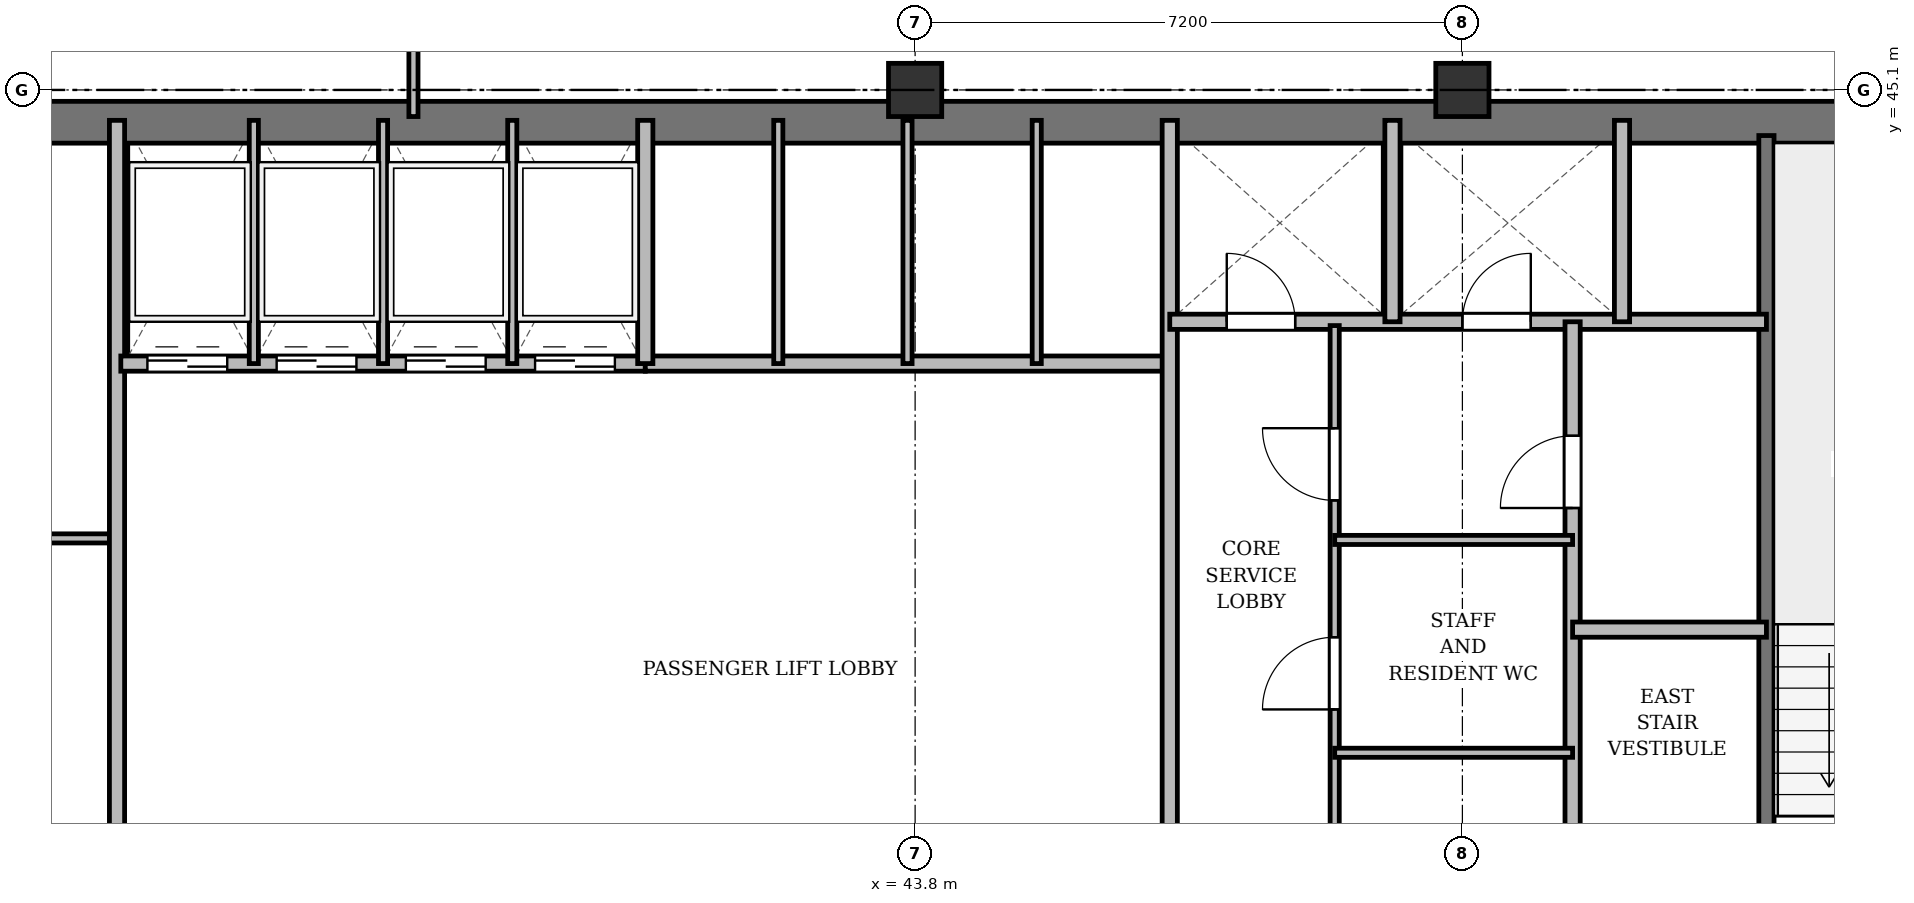
"""IFC4 building model, lengths in metres.
Left out: names, types, materials, properties, quantities, classifications, styles, units other than length and angle.
Written with IfcOpenShell. Run it as: python <this file> out.ifc"""

import sys

from ifc_helpers import new_model, si_unit, direction, frame, frame_2d, origin, origin_2d, place, context, subcontext, project, spatial, rectangle, extrude, source, transform, mapped, element, fill, save


model = new_model("IFC4")
c1 = context("Model", 3, precision=1e-05, world=origin(), true_north=direction((0.0, 1.0)))
c2 = subcontext(c1, "Body", "Model", "MODEL_VIEW")
j1 = project(units=[si_unit("LENGTHUNIT", "METRE"), si_unit("PLANEANGLEUNIT", "RADIAN")], contexts=[c1])
p1 = place(None, origin())
s1 = spatial("IfcSite", under=j1, at=p1, CompositionType="ELEMENT")
p2 = place(p1, origin())
s2 = spatial("IfcBuilding", under=s1, at=p2, CompositionType="ELEMENT")
p3 = place(p2, frame((0.0, 0.0, 157.3)))
s3 = spatial("IfcBuildingStorey", under=s2, at=p3, CompositionType="ELEMENT", Elevation=157.3)
m1 = source(origin(), c2, "Body", "SweptSolid", [
    extrude(rectangle(XDim=0.7, YDim=0.7, at=origin_2d()), origin(), (0.0, 0.0, 1.0), 3.6),
])
for number, where, z_axis, x_axis in (
    (1, (43.8, 45.1, 0.0), (0.0, 0.0, 1.0), (1.0, 0.0, 0.0)),
    (2, (51.0, 45.1, 0.0), (0.0, 0.0, 1.0), (1.0, 0.0, 0.0)),
):
    element("IfcColumn", number, at=place(p3, frame(where, z_axis=z_axis, x_axis=x_axis)), inside=s3, PredefinedType="COLUMN", context=c2, shape_type="MappedRepresentation", body=[
        mapped(m1, transform((0.0, 0.0, 0.0), x_axis=(1.0, 0.0, 0.0), y_axis=(0.0, 1.0, 0.0), z_axis=(0.0, 0.0, 1.0), scale=1.0)),
    ])
p4 = place(p3, frame((15.65, 44.675, 0.0), z_axis=(0.0, 0.0, 1.0), x_axis=(1.0, 0.0, 0.0)))
e3 = element("IfcWall", 3, at=p4, inside=s3, PredefinedType="SHEAR", context=c2, shape_type="SweptSolid", body=[
    extrude(rectangle(XDim=43.1, YDim=0.55, at=frame_2d((21.55, 0.0))), origin(), (0.0, 0.0, 1.0), 3.35),
])
p5 = place(p3, frame((55.0, 33.4, 0.0), z_axis=(0.0, 0.0, 1.0), x_axis=(0.0, 1.0, 0.0)))
e4 = element("IfcWall", 4, at=p5, inside=s3, PredefinedType="SHEAR", context=c2, shape_type="SweptSolid", body=[
    extrude(rectangle(XDim=11.1, YDim=0.2, at=frame_2d((5.55, 0.0))), origin(), (0.0, 0.0, 1.0), 3.35),
])
p6 = place(p5, frame((0.85, 0.0, 0.0)))
e5 = element("IfcOpeningElement", 5, at=p6, cuts=e4, PredefinedType="OPENING", context=c2, shape_type="SweptSolid", body=[
    extrude(rectangle(XDim=1.1, YDim=2.15, at=frame_2d((0.55, 1.075))), frame((0.0, 0.11, 0.0), z_axis=(0.0, -1.0, 0.0), x_axis=(1.0, 0.0, 0.0)), (0.0, 0.0, 1.0), 0.22),
])
p7 = place(p3, frame((26.3, 39.2, 0.0), z_axis=(0.0, 0.0, 1.0), x_axis=(1.0, 0.0, 0.0)))
e6 = element("IfcWall", 6, at=p7, inside=s3, PredefinedType="PARTITIONING", context=c2, shape_type="SweptSolid", body=[
    extrude(rectangle(XDim=7.0, YDim=0.12, at=frame_2d((3.5, 0.0))), origin(), (0.0, 0.0, 1.0), 2.85),
])
p8 = place(p7, frame((2.6, 0.0, 0.0)))
e7 = element("IfcOpeningElement", 7, at=p8, cuts=e6, PredefinedType="OPENING", context=c2, shape_type="SweptSolid", body=[
    extrude(rectangle(XDim=0.95, YDim=2.15, at=frame_2d((0.475, 1.075))), frame((0.0, 0.07, 0.0), z_axis=(0.0, -1.0, 0.0), x_axis=(1.0, 0.0, 0.0)), (0.0, 0.0, 1.0), 0.14),
])
p9 = place(p3, frame((33.3, 33.4, 0.0), z_axis=(0.0, 0.0, 1.0), x_axis=(0.0, 1.0, 0.0)))
e8 = element("IfcWall", 8, at=p9, inside=s3, PredefinedType="SOLIDWALL", context=c2, shape_type="SweptSolid", body=[
    extrude(rectangle(XDim=11.3, YDim=0.2, at=frame_2d((5.65, 0.0))), origin(), (0.0, 0.0, 1.0), 2.75),
])
p10 = place(p3, frame((33.35, 41.5, 0.0), z_axis=(0.0, 0.0, 1.0), x_axis=(1.0, 0.0, 0.0)))
e9 = element("IfcWall", 9, at=p10, inside=s3, PredefinedType="SOLIDWALL", context=c2, shape_type="SweptSolid", body=[
    extrude(rectangle(XDim=6.9, YDim=0.2, at=frame_2d((3.45, 0.0))), origin(), (0.0, 0.0, 1.0), 3.35),
])
p11 = place(p10, frame((0.35, 0.0, 0.0)))
e10 = element("IfcOpeningElement", 10, at=p11, cuts=e9, PredefinedType="OPENING", context=c2, shape_type="SweptSolid", body=[
    extrude(rectangle(XDim=1.05, YDim=2.15, at=frame_2d((0.525, 1.075))), frame((0.0, 0.11, 0.0), z_axis=(0.0, -1.0, 0.0), x_axis=(1.0, 0.0, 0.0)), (0.0, 0.0, 1.0), 0.22),
])
p12 = place(p10, frame((2.05, 0.0, 0.0)))
e11 = element("IfcOpeningElement", 11, at=p12, cuts=e9, PredefinedType="OPENING", context=c2, shape_type="SweptSolid", body=[
    extrude(rectangle(XDim=1.05, YDim=2.15, at=frame_2d((0.525, 1.075))), frame((0.0, 0.11, 0.0), z_axis=(0.0, -1.0, 0.0), x_axis=(1.0, 0.0, 0.0)), (0.0, 0.0, 1.0), 0.22),
])
p13 = place(p10, frame((3.75, 0.0, 0.0)))
e12 = element("IfcOpeningElement", 12, at=p13, cuts=e9, PredefinedType="OPENING", context=c2, shape_type="SweptSolid", body=[
    extrude(rectangle(XDim=1.05, YDim=2.15, at=frame_2d((0.525, 1.075))), frame((0.0, 0.11, 0.0), z_axis=(0.0, -1.0, 0.0), x_axis=(1.0, 0.0, 0.0)), (0.0, 0.0, 1.0), 0.22),
])
p14 = place(p10, frame((5.45, 0.0, 0.0)))
e13 = element("IfcOpeningElement", 13, at=p14, cuts=e9, PredefinedType="OPENING", context=c2, shape_type="SweptSolid", body=[
    extrude(rectangle(XDim=1.05, YDim=2.15, at=frame_2d((0.525, 1.075))), frame((0.0, 0.11, 0.0), z_axis=(0.0, -1.0, 0.0), x_axis=(1.0, 0.0, 0.0)), (0.0, 0.0, 1.0), 0.22),
])
for number, where, z_axis, x_axis in (
    (14, (35.1, 41.5, 0.0), (0.0, 0.0, 1.0), (0.0, 1.0, 0.0)),
    (15, (36.8, 41.5, 0.0), (0.0, 0.0, 1.0), (0.0, 1.0, 0.0)),
    (16, (38.5, 41.5, 0.0), (0.0, 0.0, 1.0), (0.0, 1.0, 0.0)),
):
    element("IfcWall", number, at=place(p3, frame(where, z_axis=z_axis, x_axis=x_axis)), inside=s3, PredefinedType="PARTITIONING", context=c2, shape_type="SweptSolid", body=[
        extrude(rectangle(XDim=3.2, YDim=0.12, at=frame_2d((1.6, 0.0))), origin(), (0.0, 0.0, 1.0), 3.35),
    ])
p15 = place(p3, frame((40.25, 41.5, 0.0), z_axis=(0.0, 0.0, 1.0), x_axis=(1.0, 0.0, 0.0)))
e17 = element("IfcWall", 17, at=p15, inside=s3, PredefinedType="SOLIDWALL", context=c2, shape_type="SweptSolid", body=[
    extrude(rectangle(XDim=6.9, YDim=0.2, at=frame_2d((3.45, 0.0))), origin(), (0.0, 0.0, 1.0), 2.85),
])
p16 = place(p3, frame((40.25, 41.5, 0.0), z_axis=(0.0, 0.0, 1.0), x_axis=(0.0, 1.0, 0.0)))
e18 = element("IfcWall", 18, at=p16, inside=s3, PredefinedType="SOLIDWALL", context=c2, shape_type="SweptSolid", body=[
    extrude(rectangle(XDim=3.2, YDim=0.2, at=frame_2d((1.6, 0.0))), origin(), (0.0, 0.0, 1.0), 3.35),
])
p17 = place(p3, frame((42.0, 41.5, 0.0), z_axis=(0.0, 0.0, 1.0), x_axis=(0.0, 1.0, 0.0)))
e19 = element("IfcWall", 19, at=p17, inside=s3, PredefinedType="PARTITIONING", context=c2, shape_type="SweptSolid", body=[
    extrude(rectangle(XDim=3.2, YDim=0.12, at=frame_2d((1.6, 0.0))), origin(), (0.0, 0.0, 1.0), 3.35),
])
p18 = place(p3, frame((43.7, 41.5, 0.0), z_axis=(0.0, 0.0, 1.0), x_axis=(0.0, 1.0, 0.0)))
e20 = element("IfcWall", 20, at=p18, inside=s3, PredefinedType="PARTITIONING", context=c2, shape_type="SweptSolid", body=[
    extrude(rectangle(XDim=3.2, YDim=0.12, at=frame_2d((1.6, 0.0))), origin(), (0.0, 0.0, 1.0), 2.85),
])
p19 = place(p3, frame((45.4, 41.5, 0.0), z_axis=(0.0, 0.0, 1.0), x_axis=(0.0, 1.0, 0.0)))
e21 = element("IfcWall", 21, at=p19, inside=s3, PredefinedType="PARTITIONING", context=c2, shape_type="SweptSolid", body=[
    extrude(rectangle(XDim=3.2, YDim=0.12, at=frame_2d((1.6, 0.0))), origin(), (0.0, 0.0, 1.0), 3.35),
])
p20 = place(p3, frame((47.15, 33.4, 0.0), z_axis=(0.0, 0.0, 1.0), x_axis=(0.0, 1.0, 0.0)))
e22 = element("IfcWall", 22, at=p20, inside=s3, PredefinedType="SOLIDWALL", context=c2, shape_type="SweptSolid", body=[
    extrude(rectangle(XDim=11.3, YDim=0.2, at=frame_2d((5.65, 0.0))), origin(), (0.0, 0.0, 1.0), 2.75),
])
p21 = place(p3, frame((47.15, 42.05, 0.0), z_axis=(0.0, 0.0, 1.0), x_axis=(1.0, 0.0, 0.0)))
e23 = element("IfcWall", 23, at=p21, inside=s3, PredefinedType="SOLIDWALL", context=c2, shape_type="SweptSolid", body=[
    extrude(rectangle(XDim=7.85, YDim=0.2, at=frame_2d((3.925, 0.0))), origin(), (0.0, 0.0, 1.0), 2.85),
])
p22 = place(p21, frame((0.75, 0.0, 0.0)))
e24 = element("IfcOpeningElement", 24, at=p22, cuts=e23, PredefinedType="OPENING", context=c2, shape_type="SweptSolid", body=[
    extrude(rectangle(XDim=0.9, YDim=2.1, at=frame_2d((0.45, 1.05))), frame((0.0, 0.11, 0.0), z_axis=(0.0, -1.0, 0.0), x_axis=(1.0, 0.0, 0.0)), (0.0, 0.0, 1.0), 0.22),
])
p23 = place(p21, frame((3.85, 0.0, 0.0)))
e25 = element("IfcOpeningElement", 25, at=p23, cuts=e23, PredefinedType="OPENING", context=c2, shape_type="SweptSolid", body=[
    extrude(rectangle(XDim=0.9, YDim=2.1, at=frame_2d((0.45, 1.05))), frame((0.0, 0.11, 0.0), z_axis=(0.0, -1.0, 0.0), x_axis=(1.0, 0.0, 0.0)), (0.0, 0.0, 1.0), 0.22),
])
for number, where, z_axis, x_axis in (
    (26, (50.08, 42.05, 0.0), (0.0, 0.0, 1.0), (0.0, 1.0, 0.0)),
    (27, (53.1, 42.05, 0.0), (0.0, 0.0, 1.0), (0.0, 1.0, 0.0)),
):
    element("IfcWall", number, at=place(p3, frame(where, z_axis=z_axis, x_axis=x_axis)), inside=s3, PredefinedType="SOLIDWALL", context=c2, shape_type="SweptSolid", body=[
        extrude(rectangle(XDim=2.65, YDim=0.2, at=frame_2d((1.325, 0.0))), origin(), (0.0, 0.0, 1.0), 3.35),
    ])
p24 = place(p3, frame((52.45, 33.4, 0.0), z_axis=(0.0, 0.0, 1.0), x_axis=(0.0, 1.0, 0.0)))
e28 = element("IfcWall", 28, at=p24, inside=s3, PredefinedType="PARTITIONING", context=c2, shape_type="SweptSolid", body=[
    extrude(rectangle(XDim=8.65, YDim=0.2, at=frame_2d((4.325, 0.0))), origin(), (0.0, 0.0, 1.0), 2.75),
])
p25 = place(p24, frame((6.2, 0.0, 0.0)))
e29 = element("IfcOpeningElement", 29, at=p25, cuts=e28, PredefinedType="OPENING", context=c2, shape_type="SweptSolid", body=[
    extrude(rectangle(XDim=0.95, YDim=2.15, at=frame_2d((0.475, 1.075))), frame((0.0, 0.11, 0.0), z_axis=(0.0, -1.0, 0.0), x_axis=(1.0, 0.0, 0.0)), (0.0, 0.0, 1.0), 0.22),
])
p26 = place(p3, frame((52.45, 38.0, 0.0), z_axis=(0.0, 0.0, 1.0), x_axis=(1.0, 0.0, 0.0)))
e30 = element("IfcWall", 30, at=p26, inside=s3, PredefinedType="PARTITIONING", context=c2, shape_type="SweptSolid", body=[
    extrude(rectangle(XDim=2.55, YDim=0.2, at=frame_2d((1.275, 0.0))), origin(), (0.0, 0.0, 1.0), 3.35),
])
p27 = place(p3, frame((49.32, 33.4, 0.0), z_axis=(0.0, 0.0, 1.0), x_axis=(0.0, 1.0, 0.0)))
e31 = element("IfcWall", 31, at=p27, inside=s3, PredefinedType="PARTITIONING", context=c2, shape_type="SweptSolid", body=[
    extrude(rectangle(XDim=8.6, YDim=0.12, at=frame_2d((4.3, 0.0))), origin(), (0.0, 0.0, 1.0), 2.75),
])
p28 = place(p27, frame((0.85, 0.0, 0.0)))
e32 = element("IfcOpeningElement", 32, at=p28, cuts=e31, PredefinedType="OPENING", context=c2, shape_type="SweptSolid", body=[
    extrude(rectangle(XDim=0.95, YDim=2.15, at=frame_2d((0.475, 1.075))), frame((0.0, 0.07, 0.0), z_axis=(0.0, -1.0, 0.0), x_axis=(1.0, 0.0, 0.0)), (0.0, 0.0, 1.0), 0.14),
])
p29 = place(p27, frame((3.55, 0.0, 0.0)))
e33 = element("IfcOpeningElement", 33, at=p29, cuts=e31, PredefinedType="OPENING", context=c2, shape_type="SweptSolid", body=[
    extrude(rectangle(XDim=0.95, YDim=2.15, at=frame_2d((0.475, 1.075))), frame((0.0, 0.07, 0.0), z_axis=(0.0, -1.0, 0.0), x_axis=(1.0, 0.0, 0.0)), (0.0, 0.0, 1.0), 0.14),
])
p30 = place(p27, frame((6.3, 0.0, 0.0)))
e34 = element("IfcOpeningElement", 34, at=p30, cuts=e31, PredefinedType="OPENING", context=c2, shape_type="SweptSolid", body=[
    extrude(rectangle(XDim=0.95, YDim=2.15, at=frame_2d((0.475, 1.075))), frame((0.0, 0.07, 0.0), z_axis=(0.0, -1.0, 0.0), x_axis=(1.0, 0.0, 0.0)), (0.0, 0.0, 1.0), 0.14),
])
for number, where, z_axis, x_axis in (
    (35, (49.32, 36.38, 0.0), (0.0, 0.0, 1.0), (1.0, 0.0, 0.0)),
    (36, (49.32, 39.18, 0.0), (0.0, 0.0, 1.0), (1.0, 0.0, 0.0)),
):
    element("IfcWall", number, at=place(p3, frame(where, z_axis=z_axis, x_axis=x_axis)), inside=s3, PredefinedType="PARTITIONING", context=c2, shape_type="SweptSolid", body=[
        extrude(rectangle(XDim=3.13, YDim=0.12, at=frame_2d((1.565, 0.0))), origin(), (0.0, 0.0, 1.0), 2.85),
    ])
p31 = place(p3, frame((37.2, 44.75, 0.0), z_axis=(0.0, 0.0, 1.0), x_axis=(0.0, 1.0, 0.0)))
e37 = element("IfcWall", 37, at=p31, inside=s3, PredefinedType="PARTITIONING", context=c2, shape_type="SweptSolid", body=[
    extrude(rectangle(XDim=3.61, YDim=0.12, at=frame_2d((1.805, 0.0))), origin(), (0.0, 0.0, 1.0), 2.75),
])
p32 = place(p31, frame((1.1, 0.0, 0.0)))
e38 = element("IfcOpeningElement", 38, at=p32, cuts=e37, PredefinedType="OPENING", context=c2, shape_type="SweptSolid", body=[
    extrude(rectangle(XDim=0.95, YDim=2.15, at=frame_2d((0.475, 1.075))), frame((0.0, 0.07, 0.0), z_axis=(0.0, -1.0, 0.0), x_axis=(1.0, 0.0, 0.0)), (0.0, 0.0, 1.0), 0.14),
])
m2 = source(origin(), c2, "Body", "SweptSolid", [
    extrude(rectangle(XDim=1.05, YDim=2.15, at=frame_2d((0.525, 1.075))), frame((0.0, 0.025, 0.0), z_axis=(0.0, -1.0, 0.0), x_axis=(1.0, 0.0, 0.0)), (0.0, 0.0, 1.0), 0.05),
])
p33 = place(p11, origin())
e39 = element("IfcDoor", 39, at=p33, inside=s3, OperationType="DOUBLE_DOOR_SLIDING", PredefinedType="DOOR", context=c2, shape_type="MappedRepresentation", body=[
    mapped(m2, transform((0.0, 0.0, 0.0), x_axis=(1.0, 0.0, 0.0), y_axis=(0.0, 1.0, 0.0), z_axis=(0.0, 0.0, 1.0), scale=1.0)),
])
fill(e10, e39)
p34 = place(p12, origin())
e40 = element("IfcDoor", 40, at=p34, inside=s3, OperationType="DOUBLE_DOOR_SLIDING", PredefinedType="DOOR", context=c2, shape_type="MappedRepresentation", body=[
    mapped(m2, transform((0.0, 0.0, 0.0), x_axis=(1.0, 0.0, 0.0), y_axis=(0.0, 1.0, 0.0), z_axis=(0.0, 0.0, 1.0), scale=1.0)),
])
fill(e11, e40)
p35 = place(p13, origin())
e41 = element("IfcDoor", 41, at=p35, inside=s3, OperationType="DOUBLE_DOOR_SLIDING", PredefinedType="DOOR", context=c2, shape_type="MappedRepresentation", body=[
    mapped(m2, transform((0.0, 0.0, 0.0), x_axis=(1.0, 0.0, 0.0), y_axis=(0.0, 1.0, 0.0), z_axis=(0.0, 0.0, 1.0), scale=1.0)),
])
fill(e12, e41)
p36 = place(p14, origin())
e42 = element("IfcDoor", 42, at=p36, inside=s3, OperationType="DOUBLE_DOOR_SLIDING", PredefinedType="DOOR", context=c2, shape_type="MappedRepresentation", body=[
    mapped(m2, transform((0.0, 0.0, 0.0), x_axis=(1.0, 0.0, 0.0), y_axis=(0.0, 1.0, 0.0), z_axis=(0.0, 0.0, 1.0), scale=1.0)),
])
fill(e13, e42)
m3 = source(origin(), c2, "Body", "SweptSolid", [
    extrude(rectangle(XDim=0.9, YDim=2.1, at=frame_2d((0.45, 1.05))), frame((0.0, 0.025, 0.0), z_axis=(0.0, -1.0, 0.0), x_axis=(1.0, 0.0, 0.0)), (0.0, 0.0, 1.0), 0.05),
])
p37 = place(p22, origin())
e43 = element("IfcDoor", 43, at=p37, inside=s3, OperationType="SINGLE_SWING_LEFT", PredefinedType="DOOR", context=c2, shape_type="MappedRepresentation", body=[
    mapped(m3, transform((0.0, 0.0, 0.0), x_axis=(1.0, 0.0, 0.0), y_axis=(0.0, 1.0, 0.0), z_axis=(0.0, 0.0, 1.0), scale=1.0)),
])
fill(e24, e43)
p38 = place(p23, origin())
e44 = element("IfcDoor", 44, at=p38, inside=s3, OperationType="SINGLE_SWING_RIGHT", PredefinedType="DOOR", context=c2, shape_type="MappedRepresentation", body=[
    mapped(m3, transform((0.0, 0.0, 0.0), x_axis=(1.0, 0.0, 0.0), y_axis=(0.0, 1.0, 0.0), z_axis=(0.0, 0.0, 1.0), scale=1.0)),
])
fill(e25, e44)
m4 = source(origin(), c2, "Body", "SweptSolid", [
    extrude(rectangle(XDim=0.95, YDim=2.15, at=frame_2d((0.475, 1.075))), frame((0.0, 0.025, 0.0), z_axis=(0.0, -1.0, 0.0), x_axis=(1.0, 0.0, 0.0)), (0.0, 0.0, 1.0), 0.05),
])
p39 = place(p25, origin())
e45 = element("IfcDoor", 45, at=p39, inside=s3, OperationType="SINGLE_SWING_LEFT", PredefinedType="DOOR", context=c2, shape_type="MappedRepresentation", body=[
    mapped(m4, transform((0.0, 0.0, 0.0), x_axis=(1.0, 0.0, 0.0), y_axis=(0.0, 1.0, 0.0), z_axis=(0.0, 0.0, 1.0), scale=1.0)),
])
fill(e29, e45)
p40 = place(p29, origin())
e46 = element("IfcDoor", 46, at=p40, inside=s3, OperationType="SINGLE_SWING_LEFT", PredefinedType="DOOR", context=c2, shape_type="MappedRepresentation", body=[
    mapped(m4, transform((0.0, 0.0, 0.0), x_axis=(1.0, 0.0, 0.0), y_axis=(0.0, 1.0, 0.0), z_axis=(0.0, 0.0, 1.0), scale=1.0)),
])
fill(e33, e46)
p41 = place(p30, origin())
e47 = element("IfcDoor", 47, at=p41, inside=s3, OperationType="SINGLE_SWING_RIGHT", PredefinedType="DOOR", context=c2, shape_type="MappedRepresentation", body=[
    mapped(m4, transform((0.0, 0.0, 0.0), x_axis=(1.0, 0.0, 0.0), y_axis=(0.0, 1.0, 0.0), z_axis=(0.0, 0.0, 1.0), scale=1.0)),
])
fill(e34, e47)
save(model, sys.argv[1])
